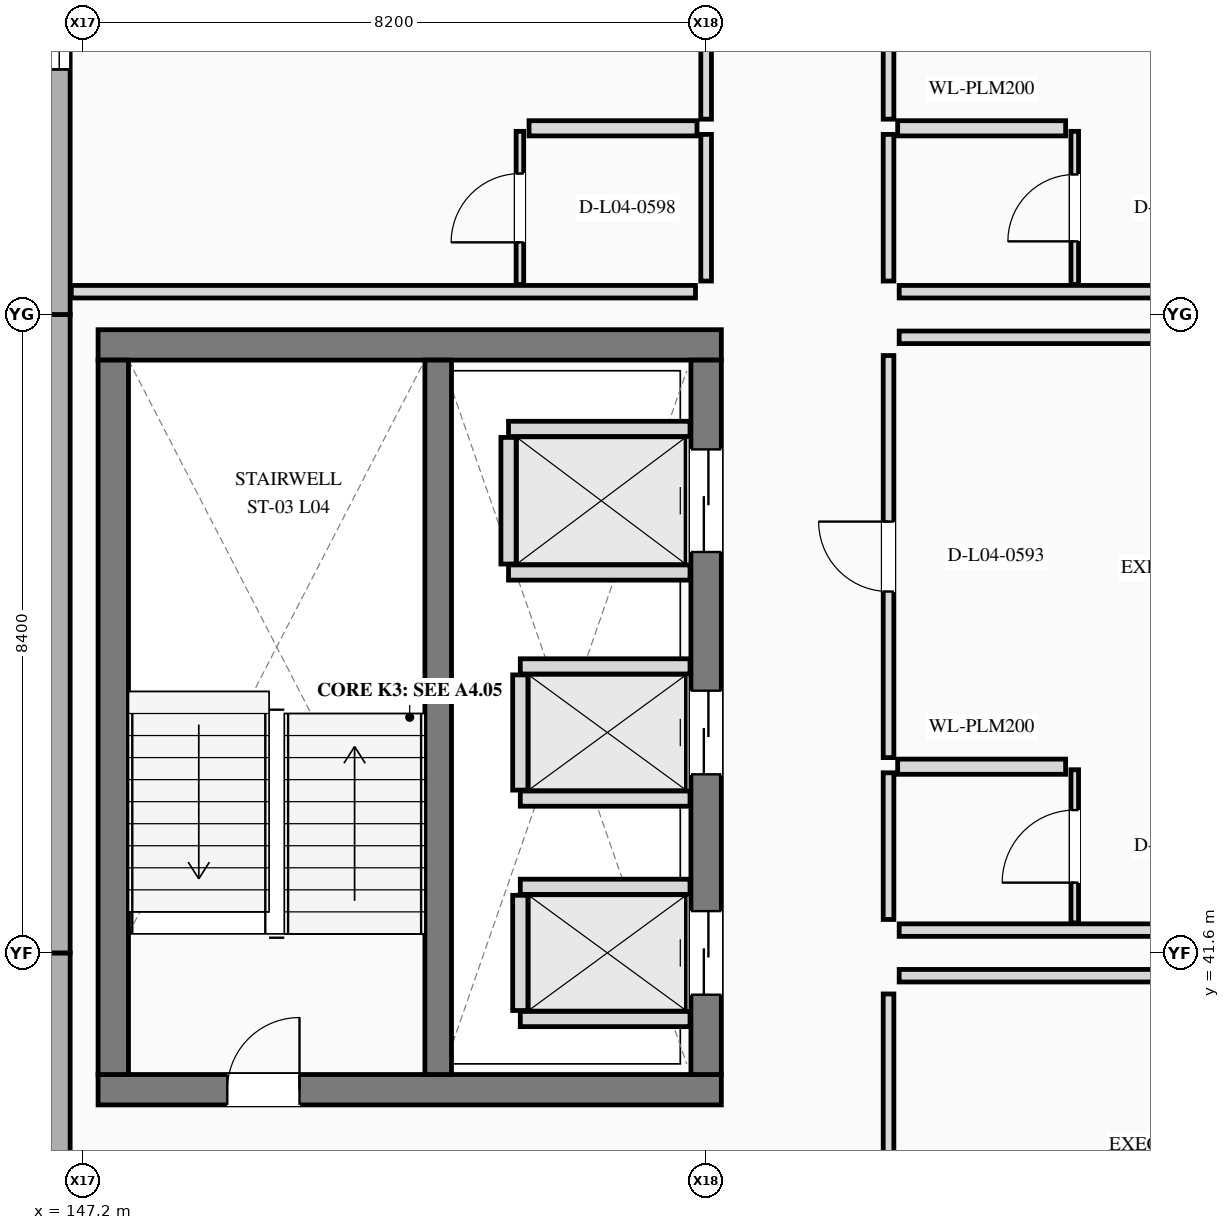
"""IFC4 building model, lengths in metres.
Left out: names, types, materials, properties, quantities, classifications, styles, units other than length and angle.
Written with IfcOpenShell. Run it as: python <this file> out.ifc"""

import sys

from ifc_helpers import new_model, si_unit, direction, frame, frame_2d, origin, place, context, subcontext, project, spatial, rectangle, extrude, element, fill, save


model = new_model("IFC4")
c1 = context("Model", 3, precision=1e-05, world=origin(), true_north=direction((0.0, 1.0)))
c2 = subcontext(c1, "Body", "Model", "MODEL_VIEW")
j1 = project(units=[si_unit("LENGTHUNIT", "METRE"), si_unit("PLANEANGLEUNIT", "RADIAN")], contexts=[c1])
p1 = place(None, origin())
s1 = spatial("IfcSite", under=j1, at=p1, CompositionType="ELEMENT")
p2 = place(p1, origin())
s2 = spatial("IfcBuilding", under=s1, at=p2, CompositionType="ELEMENT")
p3 = place(p2, frame((0.0, 0.0, 19.5)))
s3 = spatial("IfcBuildingStorey", under=s2, at=p3, CompositionType="ELEMENT", Elevation=19.5)
p4 = place(p3, frame((146.89, 33.2, 0.0), z_axis=(0.0, 0.0, 1.0), x_axis=(0.0, 1.0, 0.0)))
e1 = element("IfcWall", 1, at=p4, inside=s3, PredefinedType="STANDARD", context=c2, shape_type="SweptSolid", body=[
    extrude(rectangle(XDim=8.4, YDim=0.285, at=frame_2d((4.2, 0.0))), origin(), (0.0, 0.0, 1.0), 3.9),
])
p5 = place(p3, frame((146.89, 41.6, 0.0), z_axis=(0.0, 0.0, 1.0), x_axis=(0.0, 1.0, 0.0)))
e2 = element("IfcWall", 2, at=p5, inside=s3, PredefinedType="STANDARD", context=c2, shape_type="SweptSolid", body=[
    extrude(rectangle(XDim=8.4, YDim=0.285, at=frame_2d((4.2, 0.0))), origin(), (0.0, 0.0, 1.0), 3.9),
])
p6 = place(p3, frame((146.89, 50.0, 0.0), z_axis=(0.0, 0.0, 1.0), x_axis=(0.0, 1.0, 0.0)))
e3 = element("IfcWall", 3, at=p6, inside=s3, PredefinedType="STANDARD", context=c2, shape_type="SweptSolid", body=[
    extrude(rectangle(XDim=8.4, YDim=0.285, at=frame_2d((4.2, 0.0))), origin(), (0.0, 0.0, 1.0), 3.9),
])
p7 = place(p6, frame((3.225, 0.0, 0.85)))
e4 = element("IfcOpeningElement", 4, at=p7, cuts=e3, PredefinedType="OPENING", context=c2, shape_type="SweptSolid", body=[
    extrude(rectangle(XDim=1.95, YDim=1.85, at=frame_2d((0.975, 0.925))), frame((0.0, 0.152, 0.0), z_axis=(0.0, -1.0, 0.0), x_axis=(1.0, 0.0, 0.0)), (0.0, 0.0, 1.0), 0.305),
])
p8 = place(p3, frame((147.4, 39.8, 0.0), z_axis=(0.0, 0.0, 1.0), x_axis=(1.0, 0.0, 0.0)))
e5 = element("IfcWall", 5, at=p8, inside=s3, PredefinedType="SHEAR", context=c2, shape_type="SweptSolid", body=[
    extrude(rectangle(XDim=8.2, YDim=0.4, at=frame_2d((4.1, 0.0))), origin(), (0.0, 0.0, 1.0), 3.9),
])
p9 = place(p8, frame((1.7, 0.0, 0.0)))
e6 = element("IfcOpeningElement", 6, at=p9, cuts=e5, PredefinedType="OPENING", context=c2, shape_type="SweptSolid", body=[
    extrude(rectangle(XDim=0.95, YDim=2.2, at=frame_2d((0.475, 1.1))), frame((0.0, 0.21, 0.0), z_axis=(0.0, -1.0, 0.0), x_axis=(1.0, 0.0, 0.0)), (0.0, 0.0, 1.0), 0.42),
])
p10 = place(p3, frame((155.6, 49.6, 0.0), z_axis=(0.0, 0.0, 1.0), x_axis=(-1.0, 0.0, 0.0)))
e7 = element("IfcWall", 7, at=p10, inside=s3, PredefinedType="SHEAR", context=c2, shape_type="SweptSolid", body=[
    extrude(rectangle(XDim=8.2, YDim=0.4, at=frame_2d((4.1, 0.0))), origin(), (0.0, 0.0, 1.0), 3.9),
])
p11 = place(p3, frame((147.6, 49.4, 0.0), z_axis=(0.0, 0.0, 1.0), x_axis=(0.0, -1.0, 0.0)))
e8 = element("IfcWall", 8, at=p11, inside=s3, PredefinedType="SHEAR", context=c2, shape_type="SweptSolid", body=[
    extrude(rectangle(XDim=9.4, YDim=0.4, at=frame_2d((4.7, 0.0))), origin(), (0.0, 0.0, 1.0), 3.9),
])
p12 = place(p3, frame((155.4, 40.0, 0.0), z_axis=(0.0, 0.0, 1.0), x_axis=(0.0, 1.0, 0.0)))
e9 = element("IfcWall", 9, at=p12, inside=s3, PredefinedType="SHEAR", context=c2, shape_type="SweptSolid", body=[
    extrude(rectangle(XDim=9.4, YDim=0.4, at=frame_2d((4.7, 0.0))), origin(), (0.0, 0.0, 1.0), 3.9),
])
p13 = place(p12, frame((1.05, 0.0, 0.0)))
e10 = element("IfcOpeningElement", 10, at=p13, cuts=e9, PredefinedType="OPENING", context=c2, shape_type="SweptSolid", body=[
    extrude(rectangle(XDim=1.1, YDim=2.2, at=frame_2d((0.55, 1.1))), frame((0.0, 0.21, 0.0), z_axis=(0.0, -1.0, 0.0), x_axis=(1.0, 0.0, 0.0)), (0.0, 0.0, 1.0), 0.42),
])
p14 = place(p12, frame((3.95, 0.0, 0.0)))
e11 = element("IfcOpeningElement", 11, at=p14, cuts=e9, PredefinedType="OPENING", context=c2, shape_type="SweptSolid", body=[
    extrude(rectangle(XDim=1.1, YDim=2.2, at=frame_2d((0.55, 1.1))), frame((0.0, 0.21, 0.0), z_axis=(0.0, -1.0, 0.0), x_axis=(1.0, 0.0, 0.0)), (0.0, 0.0, 1.0), 0.42),
])
p15 = place(p12, frame((6.875, 0.0, 0.0)))
e12 = element("IfcOpeningElement", 12, at=p15, cuts=e9, PredefinedType="OPENING", context=c2, shape_type="SweptSolid", body=[
    extrude(rectangle(XDim=1.35, YDim=2.3, at=frame_2d((0.675, 1.15))), frame((0.0, 0.21, 0.0), z_axis=(0.0, -1.0, 0.0), x_axis=(1.0, 0.0, 0.0)), (0.0, 0.0, 1.0), 0.42),
])
p16 = place(p3, frame((151.875, 40.0, 0.0), z_axis=(0.0, 0.0, 1.0), x_axis=(0.0, 1.0, 0.0)))
e13 = element("IfcWall", 13, at=p16, inside=s3, PredefinedType="SHEAR", context=c2, shape_type="SweptSolid", body=[
    extrude(rectangle(XDim=9.4, YDim=0.35, at=frame_2d((4.7, 0.0))), origin(), (0.0, 0.0, 1.0), 3.9),
])
for number, where, z_axis, x_axis in (
    (14, (152.955, 40.73, 0.0), (0.0, 0.0, 1.0), (1.0, 0.0, 0.0)),
    (15, (152.955, 42.47, 0.0), (0.0, 0.0, 1.0), (1.0, 0.0, 0.0)),
):
    element("IfcWall", number, at=place(p3, frame(where, z_axis=z_axis, x_axis=x_axis)), inside=s3, PredefinedType="PLUMBINGWALL", context=c2, shape_type="SweptSolid", body=[
        extrude(rectangle(XDim=2.233, YDim=0.2, at=frame_2d((1.116, 0.0))), origin(), (0.0, 0.0, 1.0), 3.585),
    ])
p17 = place(p3, frame((152.955, 40.842, 0.0), z_axis=(0.0, 0.0, 1.0), x_axis=(0.0, 1.0, 0.0)))
e16 = element("IfcWall", 16, at=p17, inside=s3, PredefinedType="PLUMBINGWALL", context=c2, shape_type="SweptSolid", body=[
    extrude(rectangle(XDim=1.516, YDim=0.2, at=frame_2d((0.758, 0.0))), origin(), (0.0, 0.0, 1.0), 3.585),
])
for number, where, z_axis, x_axis in (
    (17, (152.955, 43.63, 0.0), (0.0, 0.0, 1.0), (1.0, 0.0, 0.0)),
    (18, (152.955, 45.37, 0.0), (0.0, 0.0, 1.0), (1.0, 0.0, 0.0)),
):
    element("IfcWall", number, at=place(p3, frame(where, z_axis=z_axis, x_axis=x_axis)), inside=s3, PredefinedType="PLUMBINGWALL", context=c2, shape_type="SweptSolid", body=[
        extrude(rectangle(XDim=2.233, YDim=0.2, at=frame_2d((1.116, 0.0))), origin(), (0.0, 0.0, 1.0), 3.585),
    ])
p18 = place(p3, frame((152.955, 43.742, 0.0), z_axis=(0.0, 0.0, 1.0), x_axis=(0.0, 1.0, 0.0)))
e19 = element("IfcWall", 19, at=p18, inside=s3, PredefinedType="PLUMBINGWALL", context=c2, shape_type="SweptSolid", body=[
    extrude(rectangle(XDim=1.516, YDim=0.2, at=frame_2d((0.758, 0.0))), origin(), (0.0, 0.0, 1.0), 3.585),
])
for number, where, z_axis, x_axis in (
    (20, (152.8, 46.605, 0.0), (0.0, 0.0, 1.0), (1.0, 0.0, 0.0)),
    (21, (152.8, 48.495, 0.0), (0.0, 0.0, 1.0), (1.0, 0.0, 0.0)),
):
    element("IfcWall", number, at=place(p3, frame(where, z_axis=z_axis, x_axis=x_axis)), inside=s3, PredefinedType="PLUMBINGWALL", context=c2, shape_type="SweptSolid", body=[
        extrude(rectangle(XDim=2.388, YDim=0.2, at=frame_2d((1.194, 0.0))), origin(), (0.0, 0.0, 1.0), 3.585),
    ])
p19 = place(p3, frame((152.8, 46.717, 0.0), z_axis=(0.0, 0.0, 1.0), x_axis=(0.0, 1.0, 0.0)))
e22 = element("IfcWall", 22, at=p19, inside=s3, PredefinedType="PLUMBINGWALL", context=c2, shape_type="SweptSolid", body=[
    extrude(rectangle(XDim=1.666, YDim=0.2, at=frame_2d((0.833, 0.0))), origin(), (0.0, 0.0, 1.0), 3.585),
])
p20 = place(p3, frame((157.8, 35.77, 0.0), z_axis=(0.0, 0.0, 1.0), x_axis=(0.0, 1.0, 0.0)))
e23 = element("IfcWall", 23, at=p20, inside=s3, PredefinedType="PARTITIONING", context=c2, shape_type="SweptSolid", body=[
    extrude(rectangle(XDim=5.29, YDim=0.14, at=frame_2d((2.645, 0.0))), origin(), (0.0, 0.0, 1.0), 3.585),
])
p21 = place(p20, frame((2.125, 0.0, 0.0)))
e24 = element("IfcOpeningElement", 24, at=p21, cuts=e23, PredefinedType="OPENING", context=c2, shape_type="SweptSolid", body=[
    extrude(rectangle(XDim=1.04, YDim=2.25, at=frame_2d((0.52, 1.125))), frame((0.0, 0.08, 0.0), z_axis=(0.0, -1.0, 0.0), x_axis=(1.0, 0.0, 0.0)), (0.0, 0.0, 1.0), 0.16),
])
p22 = place(p3, frame((157.94, 41.3, 0.0), z_axis=(0.0, 0.0, 1.0), x_axis=(1.0, 0.0, 0.0)))
e25 = element("IfcWall", 25, at=p22, inside=s3, PredefinedType="PARTITIONING", context=c2, shape_type="SweptSolid", body=[
    extrude(rectangle(XDim=8.213, YDim=0.165, at=frame_2d((4.106, 0.0))), origin(), (0.0, 0.0, 1.0), 2.975),
])
p23 = place(p3, frame((157.8, 42.04, 0.0), z_axis=(0.0, 0.0, 1.0), x_axis=(0.0, 1.0, 0.0)))
e26 = element("IfcWall", 26, at=p23, inside=s3, PredefinedType="PARTITIONING", context=c2, shape_type="SweptSolid", body=[
    extrude(rectangle(XDim=1.93, YDim=0.14, at=frame_2d((0.965, 0.0))), origin(), (0.0, 0.0, 1.0), 3.138),
])
p24 = place(p3, frame((157.8, 44.17, 0.0), z_axis=(0.0, 0.0, 1.0), x_axis=(0.0, 1.0, 0.0)))
e27 = element("IfcWall", 27, at=p24, inside=s3, PredefinedType="PARTITIONING", context=c2, shape_type="SweptSolid", body=[
    extrude(rectangle(XDim=5.29, YDim=0.14, at=frame_2d((2.645, 0.0))), origin(), (0.0, 0.0, 1.0), 3.138),
])
p25 = place(p24, frame((2.185, 0.0, 0.0)))
e28 = element("IfcOpeningElement", 28, at=p25, cuts=e27, PredefinedType="OPENING", context=c2, shape_type="SweptSolid", body=[
    extrude(rectangle(XDim=0.92, YDim=2.3, at=frame_2d((0.46, 1.15))), frame((0.0, 0.08, 0.0), z_axis=(0.0, -1.0, 0.0), x_axis=(1.0, 0.0, 0.0)), (0.0, 0.0, 1.0), 0.16),
])
for number, where, z_axis, x_axis in (
    (29, (157.94, 41.9, 0.0), (0.0, 0.0, 1.0), (1.0, 0.0, 0.0)),
    (30, (157.94, 49.7, 0.0), (0.0, 0.0, 1.0), (1.0, 0.0, 0.0)),
):
    element("IfcWall", number, at=place(p3, frame(where, z_axis=z_axis, x_axis=x_axis)), inside=s3, PredefinedType="PARTITIONING", context=c2, shape_type="SweptSolid", body=[
        extrude(rectangle(XDim=8.213, YDim=0.165, at=frame_2d((4.106, 0.0))), origin(), (0.0, 0.0, 1.0), 2.975),
    ])
p26 = place(p3, frame((157.92, 44.05, 0.0), z_axis=(0.0, 0.0, 1.0), x_axis=(1.0, 0.0, 0.0)))
e31 = element("IfcWall", 31, at=p26, inside=s3, PredefinedType="PLUMBINGWALL", context=c2, shape_type="SweptSolid", body=[
    extrude(rectangle(XDim=2.21, YDim=0.2, at=frame_2d((1.105, 0.0))), origin(), (0.0, 0.0, 1.0), 3.585),
])
p27 = place(p3, frame((160.25, 41.994, 0.0), z_axis=(0.0, 0.0, 1.0), x_axis=(0.0, 1.0, 0.0)))
e32 = element("IfcWall", 32, at=p27, inside=s3, PredefinedType="PARTITIONING", context=c2, shape_type="SweptSolid", body=[
    extrude(rectangle(XDim=2.016, YDim=0.1, at=frame_2d((1.008, 0.0))), origin(), (0.0, 0.0, 1.0), 3.138),
])
p28 = place(p27, frame((0.53, 0.0, 0.0)))
e33 = element("IfcOpeningElement", 33, at=p28, cuts=e32, PredefinedType="OPENING", context=c2, shape_type="SweptSolid", body=[
    extrude(rectangle(XDim=0.955, YDim=2.22, at=frame_2d((0.478, 1.11))), frame((0.0, 0.06, 0.0), z_axis=(0.0, -1.0, 0.0), x_axis=(1.0, 0.0, 0.0)), (0.0, 0.0, 1.0), 0.12),
])
p29 = place(p3, frame((157.8, 50.44, 0.0), z_axis=(0.0, 0.0, 1.0), x_axis=(0.0, 1.0, 0.0)))
e34 = element("IfcWall", 34, at=p29, inside=s3, PredefinedType="PARTITIONING", context=c2, shape_type="SweptSolid", body=[
    extrude(rectangle(XDim=1.93, YDim=0.14, at=frame_2d((0.965, 0.0))), origin(), (0.0, 0.0, 1.0), 3.585),
])
p30 = place(p3, frame((157.8, 52.57, 0.0), z_axis=(0.0, 0.0, 1.0), x_axis=(0.0, 1.0, 0.0)))
e35 = element("IfcWall", 35, at=p30, inside=s3, PredefinedType="PARTITIONING", context=c2, shape_type="SweptSolid", body=[
    extrude(rectangle(XDim=5.29, YDim=0.14, at=frame_2d((2.645, 0.0))), origin(), (0.0, 0.0, 1.0), 3.585),
])
p31 = place(p30, frame((2.17, 0.0, 0.0)))
e36 = element("IfcOpeningElement", 36, at=p31, cuts=e35, PredefinedType="OPENING", context=c2, shape_type="SweptSolid", body=[
    extrude(rectangle(XDim=0.95, YDim=2.3, at=frame_2d((0.475, 1.15))), frame((0.0, 0.08, 0.0), z_axis=(0.0, -1.0, 0.0), x_axis=(1.0, 0.0, 0.0)), (0.0, 0.0, 1.0), 0.16),
])
p32 = place(p3, frame((157.94, 50.3, 0.0), z_axis=(0.0, 0.0, 1.0), x_axis=(1.0, 0.0, 0.0)))
e37 = element("IfcWall", 37, at=p32, inside=s3, PredefinedType="PARTITIONING", context=c2, shape_type="SweptSolid", body=[
    extrude(rectangle(XDim=8.213, YDim=0.165, at=frame_2d((4.106, 0.0))), origin(), (0.0, 0.0, 1.0), 2.975),
])
p33 = place(p3, frame((157.92, 52.45, 0.0), z_axis=(0.0, 0.0, 1.0), x_axis=(1.0, 0.0, 0.0)))
e38 = element("IfcWall", 38, at=p33, inside=s3, PredefinedType="PLUMBINGWALL", context=c2, shape_type="SweptSolid", body=[
    extrude(rectangle(XDim=2.21, YDim=0.2, at=frame_2d((1.105, 0.0))), origin(), (0.0, 0.0, 1.0), 3.585),
])
p34 = place(p3, frame((160.25, 50.395, 0.0), z_axis=(0.0, 0.0, 1.0), x_axis=(0.0, 1.0, 0.0)))
e39 = element("IfcWall", 39, at=p34, inside=s3, PredefinedType="PARTITIONING", context=c2, shape_type="SweptSolid", body=[
    extrude(rectangle(XDim=2.015, YDim=0.1, at=frame_2d((1.008, 0.0))), origin(), (0.0, 0.0, 1.0), 3.585),
])
p35 = place(p34, frame((0.568, 0.0, 0.0)))
e40 = element("IfcOpeningElement", 40, at=p35, cuts=e39, PredefinedType="OPENING", context=c2, shape_type="SweptSolid", body=[
    extrude(rectangle(XDim=0.88, YDim=2.1, at=frame_2d((0.44, 1.05))), frame((0.0, 0.06, 0.0), z_axis=(0.0, -1.0, 0.0), x_axis=(1.0, 0.0, 0.0)), (0.0, 0.0, 1.0), 0.12),
])
p36 = place(p3, frame((155.4, 50.44, 0.0), z_axis=(0.0, 0.0, 1.0), x_axis=(0.0, 1.0, 0.0)))
e41 = element("IfcWall", 41, at=p36, inside=s3, PredefinedType="PARTITIONING", context=c2, shape_type="SweptSolid", body=[
    extrude(rectangle(XDim=1.93, YDim=0.14, at=frame_2d((0.965, 0.0))), origin(), (0.0, 0.0, 1.0), 2.975),
])
p37 = place(p3, frame((155.4, 52.57, 0.0), z_axis=(0.0, 0.0, 1.0), x_axis=(0.0, 1.0, 0.0)))
e42 = element("IfcWall", 42, at=p37, inside=s3, PredefinedType="PARTITIONING", context=c2, shape_type="SweptSolid", body=[
    extrude(rectangle(XDim=5.29, YDim=0.14, at=frame_2d((2.645, 0.0))), origin(), (0.0, 0.0, 1.0), 2.975),
])
p38 = place(p37, frame((2.155, 0.0, 0.0)))
e43 = element("IfcOpeningElement", 43, at=p38, cuts=e42, PredefinedType="OPENING", context=c2, shape_type="SweptSolid", body=[
    extrude(rectangle(XDim=0.98, YDim=2.35, at=frame_2d((0.49, 1.175))), frame((0.0, 0.08, 0.0), z_axis=(0.0, -1.0, 0.0), x_axis=(1.0, 0.0, 0.0)), (0.0, 0.0, 1.0), 0.16),
])
p39 = place(p3, frame((147.048, 50.3, 0.0), z_axis=(0.0, 0.0, 1.0), x_axis=(1.0, 0.0, 0.0)))
e44 = element("IfcWall", 44, at=p39, inside=s3, PredefinedType="PARTITIONING", context=c2, shape_type="SweptSolid", body=[
    extrude(rectangle(XDim=8.212, YDim=0.165, at=frame_2d((4.106, 0.0))), origin(), (0.0, 0.0, 1.0), 3.585),
])
p40 = place(p3, frame((153.07, 52.45, 0.0), z_axis=(0.0, 0.0, 1.0), x_axis=(1.0, 0.0, 0.0)))
e45 = element("IfcWall", 45, at=p40, inside=s3, PredefinedType="PLUMBINGWALL", context=c2, shape_type="SweptSolid", body=[
    extrude(rectangle(XDim=2.21, YDim=0.2, at=frame_2d((1.105, 0.0))), origin(), (0.0, 0.0, 1.0), 3.585),
])
p41 = place(p3, frame((152.95, 50.395, 0.0), z_axis=(0.0, 0.0, 1.0), x_axis=(0.0, 1.0, 0.0)))
e46 = element("IfcWall", 46, at=p41, inside=s3, PredefinedType="PARTITIONING", context=c2, shape_type="SweptSolid", body=[
    extrude(rectangle(XDim=2.015, YDim=0.1, at=frame_2d((1.008, 0.0))), origin(), (0.0, 0.0, 1.0), 3.585),
])
p42 = place(p41, frame((0.555, 0.0, 0.0)))
e47 = element("IfcOpeningElement", 47, at=p42, cuts=e46, PredefinedType="OPENING", context=c2, shape_type="SweptSolid", body=[
    extrude(rectangle(XDim=0.905, YDim=2.1, at=frame_2d((0.453, 1.05))), frame((0.0, 0.06, 0.0), z_axis=(0.0, -1.0, 0.0), x_axis=(1.0, 0.0, 0.0)), (0.0, 0.0, 1.0), 0.12),
])
p43 = place(p7, origin())
e48 = element("IfcWindow", 48, at=p43, inside=s3, PartitioningType="SINGLE_PANEL", PredefinedType="WINDOW", context=c2, shape_type="SweptSolid", body=[
    extrude(rectangle(XDim=1.95, YDim=1.85, at=frame_2d((0.975, 0.925))), frame((0.0, 0.03, 0.0), z_axis=(0.0, -1.0, 0.0), x_axis=(1.0, 0.0, 0.0)), (0.0, 0.0, 1.0), 0.06),
])
fill(e4, e48)
p44 = place(p9, origin())
e49 = element("IfcDoor", 49, at=p44, inside=s3, OperationType="SINGLE_SWING_RIGHT", PredefinedType="DOOR", context=c2, shape_type="SweptSolid", body=[
    extrude(rectangle(XDim=0.95, YDim=2.2, at=frame_2d((0.475, 1.1))), frame((0.0, 0.025, 0.0), z_axis=(0.0, -1.0, 0.0), x_axis=(1.0, 0.0, 0.0)), (0.0, 0.0, 1.0), 0.05),
])
fill(e6, e49)
p45 = place(p13, origin())
e50 = element("IfcDoor", 50, at=p45, inside=s3, OperationType="SLIDING_TO_LEFT", PredefinedType="DOOR", context=c2, shape_type="SweptSolid", body=[
    extrude(rectangle(XDim=1.1, YDim=2.2, at=frame_2d((0.55, 1.1))), frame((0.0, 0.025, 0.0), z_axis=(0.0, -1.0, 0.0), x_axis=(1.0, 0.0, 0.0)), (0.0, 0.0, 1.0), 0.05),
])
fill(e10, e50)
p46 = place(p14, origin())
e51 = element("IfcDoor", 51, at=p46, inside=s3, OperationType="SLIDING_TO_RIGHT", PredefinedType="DOOR", context=c2, shape_type="SweptSolid", body=[
    extrude(rectangle(XDim=1.1, YDim=2.2, at=frame_2d((0.55, 1.1))), frame((0.0, 0.025, 0.0), z_axis=(0.0, -1.0, 0.0), x_axis=(1.0, 0.0, 0.0)), (0.0, 0.0, 1.0), 0.05),
])
fill(e11, e51)
p47 = place(p15, origin())
e52 = element("IfcDoor", 52, at=p47, inside=s3, OperationType="SLIDING_TO_LEFT", PredefinedType="DOOR", context=c2, shape_type="SweptSolid", body=[
    extrude(rectangle(XDim=1.35, YDim=2.3, at=frame_2d((0.675, 1.15))), frame((0.0, 0.025, 0.0), z_axis=(0.0, -1.0, 0.0), x_axis=(1.0, 0.0, 0.0)), (0.0, 0.0, 1.0), 0.05),
])
fill(e12, e52)
p48 = place(p25, origin())
e53 = element("IfcDoor", 53, at=p48, inside=s3, OperationType="SINGLE_SWING_RIGHT", PredefinedType="DOOR", context=c2, shape_type="SweptSolid", body=[
    extrude(rectangle(XDim=0.92, YDim=2.3, at=frame_2d((0.46, 1.15))), frame((0.0, 0.025, 0.0), z_axis=(0.0, -1.0, 0.0), x_axis=(1.0, 0.0, 0.0)), (0.0, 0.0, 1.0), 0.05),
])
fill(e28, e53)
p49 = place(p28, origin())
e54 = element("IfcDoor", 54, at=p49, inside=s3, OperationType="SINGLE_SWING_LEFT", PredefinedType="DOOR", context=c2, shape_type="SweptSolid", body=[
    extrude(rectangle(XDim=0.955, YDim=2.22, at=frame_2d((0.478, 1.11))), frame((0.0, 0.025, 0.0), z_axis=(0.0, -1.0, 0.0), x_axis=(1.0, 0.0, 0.0)), (0.0, 0.0, 1.0), 0.05),
])
fill(e33, e54)
p50 = place(p35, origin())
e55 = element("IfcDoor", 55, at=p50, inside=s3, OperationType="SINGLE_SWING_LEFT", PredefinedType="DOOR", context=c2, shape_type="SweptSolid", body=[
    extrude(rectangle(XDim=0.88, YDim=2.1, at=frame_2d((0.44, 1.05))), frame((0.0, 0.025, 0.0), z_axis=(0.0, -1.0, 0.0), x_axis=(1.0, 0.0, 0.0)), (0.0, 0.0, 1.0), 0.05),
])
fill(e40, e55)
p51 = place(p42, origin())
e56 = element("IfcDoor", 56, at=p51, inside=s3, OperationType="SINGLE_SWING_LEFT", PredefinedType="DOOR", context=c2, shape_type="SweptSolid", body=[
    extrude(rectangle(XDim=0.905, YDim=2.1, at=frame_2d((0.453, 1.05))), frame((0.0, 0.025, 0.0), z_axis=(0.0, -1.0, 0.0), x_axis=(1.0, 0.0, 0.0)), (0.0, 0.0, 1.0), 0.05),
])
fill(e47, e56)
save(model, sys.argv[1])
